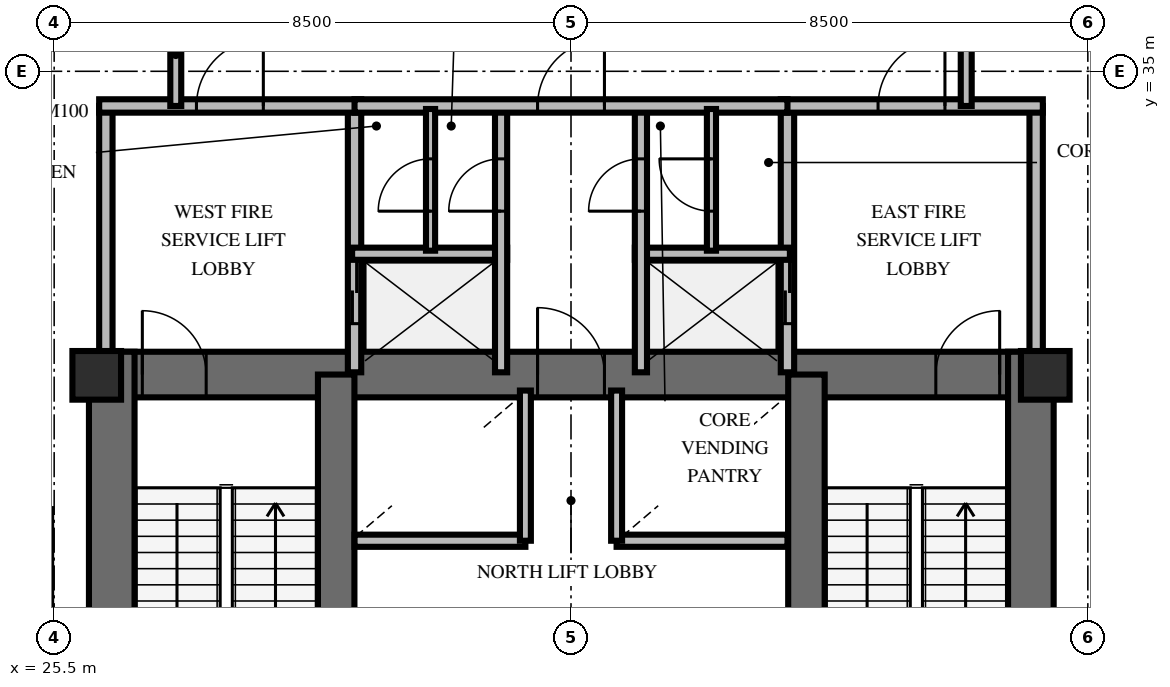
"""IFC4 building model, lengths in metres.
Left out: names, types, materials, properties, quantities, classifications, styles, units other than length and angle.
Written with IfcOpenShell. Run it as: python <this file> out.ifc"""

import sys

from ifc_helpers import new_model, si_unit, direction, frame, frame_2d, origin, origin_2d, place, context, subcontext, project, spatial, rectangle, extrude, element, fill, save


model = new_model("IFC4")
c1 = context("Model", 3, precision=1e-05, world=origin(), true_north=direction((0.0, 1.0)))
c2 = subcontext(c1, "Body", "Model", "MODEL_VIEW")
j1 = project(units=[si_unit("LENGTHUNIT", "METRE"), si_unit("PLANEANGLEUNIT", "RADIAN")], contexts=[c1])
p1 = place(None, origin())
s1 = spatial("IfcSite", under=j1, at=p1, CompositionType="ELEMENT")
p2 = place(p1, origin())
s2 = spatial("IfcBuilding", under=s1, at=p2, CompositionType="ELEMENT")
p3 = place(p2, frame((0.0, 0.0, 109.8)))
s3 = spatial("IfcBuildingStorey", under=s2, at=p3, CompositionType="ELEMENT", Elevation=109.8)
p4 = place(p3, frame((26.072, 30.013, 0.0), z_axis=(0.0, 0.0, 1.0), x_axis=(1.0, 0.0, 0.0)))
e1 = element("IfcWall", 1, at=p4, inside=s3, PredefinedType="SHEAR", context=c2, shape_type="SweptSolid", body=[
    extrude(rectangle(XDim=15.866, YDim=0.75, at=frame_2d((7.933, 0.0))), origin(), (0.0, 0.0, 1.0), 4.0),
])
p5 = place(p4, frame((0.878, 0.0, 0.0)))
e2 = element("IfcOpeningElement", 2, at=p5, cuts=e1, PredefinedType="OPENING", context=c2, shape_type="SweptSolid", body=[
    extrude(rectangle(XDim=1.05, YDim=2.15, at=frame_2d((0.525, 1.075))), frame((0.0, 0.385, 0.0), z_axis=(0.0, -1.0, 0.0), x_axis=(1.0, 0.0, 0.0)), (0.0, 0.0, 1.0), 0.77),
])
p6 = place(p4, frame((13.928, 0.0, 0.0)))
e3 = element("IfcOpeningElement", 3, at=p6, cuts=e1, PredefinedType="OPENING", context=c2, shape_type="SweptSolid", body=[
    extrude(rectangle(XDim=1.05, YDim=2.15, at=frame_2d((0.525, 1.075))), frame((0.0, 0.385, 0.0), z_axis=(0.0, -1.0, 0.0), x_axis=(1.0, 0.0, 0.0)), (0.0, 0.0, 1.0), 0.77),
])
p7 = place(p4, frame((7.378, 0.0, 0.0)))
e4 = element("IfcOpeningElement", 4, at=p7, cuts=e1, PredefinedType="OPENING", context=c2, shape_type="SweptSolid", body=[
    extrude(rectangle(XDim=1.1, YDim=2.15, at=frame_2d((0.55, 1.075))), frame((0.0, 0.385, 0.0), z_axis=(0.0, -1.0, 0.0), x_axis=(1.0, 0.0, 0.0)), (0.0, 0.0, 1.0), 0.77),
])
for number, where, z_axis, x_axis in (
    (5, (26.447, 19.812, 0.0), (0.0, 0.0, 1.0), (0.0, 1.0, 0.0)),
    (6, (41.563, 19.812, 0.0), (0.0, 0.0, 1.0), (0.0, 1.0, 0.0)),
):
    element("IfcWall", number, at=place(p3, frame(where, z_axis=z_axis, x_axis=x_axis)), inside=s3, PredefinedType="SHEAR", context=c2, shape_type="SweptSolid", body=[
        extrude(rectangle(XDim=10.576, YDim=0.75, at=frame_2d((5.288, 0.0))), origin(), (0.0, 0.0, 1.0), 4.0),
    ])
for number, where, z_axis, x_axis in (
    (7, (30.138, 20.187, 0.0), (0.0, 0.0, 1.0), (0.0, 1.0, 0.0)),
    (8, (37.872, 20.187, 0.0), (0.0, 0.0, 1.0), (0.0, 1.0, 0.0)),
):
    element("IfcWall", number, at=place(p3, frame(where, z_axis=z_axis, x_axis=x_axis)), inside=s3, PredefinedType="SHEAR", context=c2, shape_type="SweptSolid", body=[
        extrude(rectangle(XDim=9.826, YDim=0.6, at=frame_2d((4.913, 0.0))), origin(), (0.0, 0.0, 1.0), 4.0),
    ])
for number, where, z_axis, x_axis in (
    (9, (26.2, 30.0, 0.0), (0.0, 0.0, 1.0), (1.0, 0.0, 0.0)),
    (10, (41.8, 30.0, 0.0), (0.0, 0.0, 1.0), (1.0, 0.0, 0.0)),
):
    element("IfcColumn", number, at=place(p3, frame(where, z_axis=z_axis, x_axis=x_axis)), inside=s3, PredefinedType="PILASTER", context=c2, shape_type="SweptSolid", body=[
        extrude(rectangle(XDim=0.8, YDim=0.8, at=origin_2d()), origin(), (0.0, 0.0, 1.0), 4.0),
    ])
p8 = place(p3, frame((26.35, 30.05, 0.0), z_axis=(0.0, 0.0, 1.0), x_axis=(0.0, 1.0, 0.0)))
e11 = element("IfcWall", 11, at=p8, inside=s3, PredefinedType="SOLIDWALL", context=c2, shape_type="SweptSolid", body=[
    extrude(rectangle(XDim=4.38, YDim=0.22, at=frame_2d((2.19, 0.0))), origin(), (0.0, 0.0, 1.0), 2.8),
])
p9 = place(p3, frame((30.44, 30.05, 0.0), z_axis=(0.0, 0.0, 1.0), x_axis=(0.0, 1.0, 0.0)))
e12 = element("IfcWall", 12, at=p9, inside=s3, PredefinedType="SOLIDWALL", context=c2, shape_type="SweptSolid", body=[
    extrude(rectangle(XDim=4.38, YDim=0.22, at=frame_2d((2.19, 0.0))), origin(), (0.0, 0.0, 1.0), 2.8),
])
p10 = place(p9, frame((0.8, 0.0, 0.0)))
e13 = element("IfcOpeningElement", 13, at=p10, cuts=e12, PredefinedType="OPENING", context=c2, shape_type="SweptSolid", body=[
    extrude(rectangle(XDim=1.05, YDim=2.1, at=frame_2d((0.525, 1.05))), frame((0.0, 0.12, 0.0), z_axis=(0.0, -1.0, 0.0), x_axis=(1.0, 0.0, 0.0)), (0.0, 0.0, 1.0), 0.24),
])
p11 = place(p3, frame((26.24, 34.43, 0.0), z_axis=(0.0, 0.0, 1.0), x_axis=(1.0, 0.0, 0.0)))
e14 = element("IfcWall", 14, at=p11, inside=s3, PredefinedType="SOLIDWALL", context=c2, shape_type="SweptSolid", body=[
    extrude(rectangle(XDim=4.31, YDim=0.22, at=frame_2d((2.155, 0.0))), origin(), (0.0, 0.0, 1.0), 2.8),
])
p12 = place(p11, frame((1.6, 0.0, 0.0)))
e15 = element("IfcOpeningElement", 15, at=p12, cuts=e14, PredefinedType="OPENING", context=c2, shape_type="SweptSolid", body=[
    extrude(rectangle(XDim=1.1, YDim=2.15, at=frame_2d((0.55, 1.075))), frame((0.0, 0.12, 0.0), z_axis=(0.0, -1.0, 0.0), x_axis=(1.0, 0.0, 0.0)), (0.0, 0.0, 1.0), 0.24),
])
p13 = place(p3, frame((30.4, 32.0, 0.0), z_axis=(0.0, 0.0, 1.0), x_axis=(1.0, 0.0, 0.0)))
e16 = element("IfcWall", 16, at=p13, inside=s3, PredefinedType="SOLIDWALL", context=c2, shape_type="SweptSolid", body=[
    extrude(rectangle(XDim=2.55, YDim=0.2, at=frame_2d((1.275, 0.0))), origin(), (0.0, 0.0, 1.0), 2.8),
])
p14 = place(p3, frame((32.85, 30.05, 0.0), z_axis=(0.0, 0.0, 1.0), x_axis=(0.0, 1.0, 0.0)))
e17 = element("IfcWall", 17, at=p14, inside=s3, PredefinedType="SOLIDWALL", context=c2, shape_type="SweptSolid", body=[
    extrude(rectangle(XDim=4.38, YDim=0.2, at=frame_2d((2.19, 0.0))), origin(), (0.0, 0.0, 1.0), 2.8),
])
p15 = place(p14, frame((2.65, 0.0, 0.0)))
e18 = element("IfcOpeningElement", 18, at=p15, cuts=e17, PredefinedType="OPENING", context=c2, shape_type="SweptSolid", body=[
    extrude(rectangle(XDim=0.86, YDim=2.05, at=frame_2d((0.43, 1.025))), frame((0.0, 0.11, 0.0), z_axis=(0.0, -1.0, 0.0), x_axis=(1.0, 0.0, 0.0)), (0.0, 0.0, 1.0), 0.22),
])
p16 = place(p3, frame((37.56, 30.05, 0.0), z_axis=(0.0, 0.0, 1.0), x_axis=(0.0, 1.0, 0.0)))
e19 = element("IfcWall", 19, at=p16, inside=s3, PredefinedType="SOLIDWALL", context=c2, shape_type="SweptSolid", body=[
    extrude(rectangle(XDim=4.38, YDim=0.22, at=frame_2d((2.19, 0.0))), origin(), (0.0, 0.0, 1.0), 2.8),
])
p17 = place(p16, frame((0.8, 0.0, 0.0)))
e20 = element("IfcOpeningElement", 20, at=p17, cuts=e19, PredefinedType="OPENING", context=c2, shape_type="SweptSolid", body=[
    extrude(rectangle(XDim=1.05, YDim=2.1, at=frame_2d((0.525, 1.05))), frame((0.0, 0.12, 0.0), z_axis=(0.0, -1.0, 0.0), x_axis=(1.0, 0.0, 0.0)), (0.0, 0.0, 1.0), 0.24),
])
p18 = place(p3, frame((41.65, 30.05, 0.0), z_axis=(0.0, 0.0, 1.0), x_axis=(0.0, 1.0, 0.0)))
e21 = element("IfcWall", 21, at=p18, inside=s3, PredefinedType="SOLIDWALL", context=c2, shape_type="SweptSolid", body=[
    extrude(rectangle(XDim=4.38, YDim=0.22, at=frame_2d((2.19, 0.0))), origin(), (0.0, 0.0, 1.0), 2.8),
])
p19 = place(p3, frame((37.45, 34.43, 0.0), z_axis=(0.0, 0.0, 1.0), x_axis=(1.0, 0.0, 0.0)))
e22 = element("IfcWall", 22, at=p19, inside=s3, PredefinedType="SOLIDWALL", context=c2, shape_type="SweptSolid", body=[
    extrude(rectangle(XDim=4.31, YDim=0.22, at=frame_2d((2.155, 0.0))), origin(), (0.0, 0.0, 1.0), 2.8),
])
p20 = place(p19, frame((1.6, 0.0, 0.0)))
e23 = element("IfcOpeningElement", 23, at=p20, cuts=e22, PredefinedType="OPENING", context=c2, shape_type="SweptSolid", body=[
    extrude(rectangle(XDim=1.1, YDim=2.15, at=frame_2d((0.55, 1.075))), frame((0.0, 0.12, 0.0), z_axis=(0.0, -1.0, 0.0), x_axis=(1.0, 0.0, 0.0)), (0.0, 0.0, 1.0), 0.24),
])
p21 = place(p3, frame((35.05, 32.0, 0.0), z_axis=(0.0, 0.0, 1.0), x_axis=(1.0, 0.0, 0.0)))
e24 = element("IfcWall", 24, at=p21, inside=s3, PredefinedType="SOLIDWALL", context=c2, shape_type="SweptSolid", body=[
    extrude(rectangle(XDim=2.55, YDim=0.2, at=frame_2d((1.275, 0.0))), origin(), (0.0, 0.0, 1.0), 2.8),
])
p22 = place(p3, frame((35.15, 30.05, 0.0), z_axis=(0.0, 0.0, 1.0), x_axis=(0.0, 1.0, 0.0)))
e25 = element("IfcWall", 25, at=p22, inside=s3, PredefinedType="SOLIDWALL", context=c2, shape_type="SweptSolid", body=[
    extrude(rectangle(XDim=4.38, YDim=0.2, at=frame_2d((2.19, 0.0))), origin(), (0.0, 0.0, 1.0), 2.8),
])
p23 = place(p22, frame((2.65, 0.0, 0.0)))
e26 = element("IfcOpeningElement", 26, at=p23, cuts=e25, PredefinedType="OPENING", context=c2, shape_type="SweptSolid", body=[
    extrude(rectangle(XDim=0.86, YDim=2.05, at=frame_2d((0.43, 1.025))), frame((0.0, 0.11, 0.0), z_axis=(0.0, -1.0, 0.0), x_axis=(1.0, 0.0, 0.0)), (0.0, 0.0, 1.0), 0.22),
])
p24 = place(p3, frame((30.44, 34.43, 0.0), z_axis=(0.0, 0.0, 1.0), x_axis=(1.0, 0.0, 0.0)))
e27 = element("IfcWall", 27, at=p24, inside=s3, PredefinedType="SOLIDWALL", context=c2, shape_type="SweptSolid", body=[
    extrude(rectangle(XDim=7.12, YDim=0.22, at=frame_2d((3.56, 0.0))), origin(), (0.0, 0.0, 1.0), 2.8),
])
p25 = place(p24, frame((3.01, 0.0, 0.0)))
e28 = element("IfcOpeningElement", 28, at=p25, cuts=e27, PredefinedType="OPENING", context=c2, shape_type="SweptSolid", body=[
    extrude(rectangle(XDim=1.1, YDim=2.15, at=frame_2d((0.55, 1.075))), frame((0.0, 0.12, 0.0), z_axis=(0.0, -1.0, 0.0), x_axis=(1.0, 0.0, 0.0)), (0.0, 0.0, 1.0), 0.24),
])
p26 = place(p3, frame((31.69, 32.05, 0.0), z_axis=(0.0, 0.0, 1.0), x_axis=(0.0, 1.0, 0.0)))
e29 = element("IfcWall", 29, at=p26, inside=s3, PredefinedType="PARTITIONING", context=c2, shape_type="SweptSolid", body=[
    extrude(rectangle(XDim=2.33, YDim=0.15, at=frame_2d((1.165, 0.0))), origin(), (0.0, 0.0, 1.0), 2.8),
])
p27 = place(p26, frame((0.65, 0.0, 0.0)))
e30 = element("IfcOpeningElement", 30, at=p27, cuts=e29, PredefinedType="OPENING", context=c2, shape_type="SweptSolid", body=[
    extrude(rectangle(XDim=0.86, YDim=2.05, at=frame_2d((0.43, 1.025))), frame((0.0, 0.085, 0.0), z_axis=(0.0, -1.0, 0.0), x_axis=(1.0, 0.0, 0.0)), (0.0, 0.0, 1.0), 0.17),
])
p28 = place(p3, frame((36.31, 32.05, 0.0), z_axis=(0.0, 0.0, 1.0), x_axis=(0.0, 1.0, 0.0)))
e31 = element("IfcWall", 31, at=p28, inside=s3, PredefinedType="PARTITIONING", context=c2, shape_type="SweptSolid", body=[
    extrude(rectangle(XDim=2.33, YDim=0.15, at=frame_2d((1.165, 0.0))), origin(), (0.0, 0.0, 1.0), 2.8),
])
p29 = place(p28, frame((0.65, 0.0, 0.0)))
e32 = element("IfcOpeningElement", 32, at=p29, cuts=e31, PredefinedType="OPENING", context=c2, shape_type="SweptSolid", body=[
    extrude(rectangle(XDim=0.86, YDim=2.05, at=frame_2d((0.43, 1.025))), frame((0.0, 0.085, 0.0), z_axis=(0.0, -1.0, 0.0), x_axis=(1.0, 0.0, 0.0)), (0.0, 0.0, 1.0), 0.17),
])
p30 = place(p3, frame((30.44, 27.28, 0.0), z_axis=(0.0, 0.0, 1.0), x_axis=(1.0, 0.0, 0.0)))
e33 = element("IfcWall", 33, at=p30, inside=s3, PredefinedType="SOLIDWALL", context=c2, shape_type="SweptSolid", body=[
    extrude(rectangle(XDim=2.81, YDim=0.2, at=frame_2d((1.405, 0.0))), origin(), (0.0, 0.0, 1.0), 2.8),
])
p31 = place(p3, frame((33.25, 27.28, 0.0), z_axis=(0.0, 0.0, 1.0), x_axis=(0.0, 1.0, 0.0)))
e34 = element("IfcWall", 34, at=p31, inside=s3, PredefinedType="SOLIDWALL", context=c2, shape_type="SweptSolid", body=[
    extrude(rectangle(XDim=2.47, YDim=0.18, at=frame_2d((1.235, 0.0))), origin(), (0.0, 0.0, 1.0), 2.8),
])
p32 = place(p3, frame((34.75, 27.28, 0.0), z_axis=(0.0, 0.0, 1.0), x_axis=(1.0, 0.0, 0.0)))
e35 = element("IfcWall", 35, at=p32, inside=s3, PredefinedType="SOLIDWALL", context=c2, shape_type="SweptSolid", body=[
    extrude(rectangle(XDim=2.81, YDim=0.2, at=frame_2d((1.405, 0.0))), origin(), (0.0, 0.0, 1.0), 2.8),
])
p33 = place(p3, frame((34.75, 27.28, 0.0), z_axis=(0.0, 0.0, 1.0), x_axis=(0.0, 1.0, 0.0)))
e36 = element("IfcWall", 36, at=p33, inside=s3, PredefinedType="SOLIDWALL", context=c2, shape_type="SweptSolid", body=[
    extrude(rectangle(XDim=2.47, YDim=0.18, at=frame_2d((1.235, 0.0))), origin(), (0.0, 0.0, 1.0), 2.8),
])
for number, where, z_axis, x_axis in (
    (37, (27.5, 34.43, 0.0), (0.0, 0.0, 1.0), (0.0, 1.0, 0.0)),
    (38, (40.5, 36.123, 0.0), (0.0, 0.0, 1.0), (0.0, -1.0, 0.0)),
):
    element("IfcWall", number, at=place(p3, frame(where, z_axis=z_axis, x_axis=x_axis)), inside=s3, PredefinedType="PARTITIONING", context=c2, shape_type="SweptSolid", body=[
        extrude(rectangle(XDim=1.693, YDim=0.18, at=frame_2d((0.846, 0.0))), origin(), (0.0, 0.0, 1.0), 2.8),
    ])
p34 = place(p3, frame((26.613, 37.798, 0.0), z_axis=(0.0, 0.0, 1.0), x_axis=(-0.754140701917, -0.656712876158, 0.0)))
e39 = element("IfcWall", 39, at=p34, inside=s3, PredefinedType="PARTITIONING", context=c2, shape_type="SweptSolid", body=[
    extrude(rectangle(XDim=4.355, YDim=0.18, at=frame_2d((2.178, 0.0))), origin(), (0.0, 0.0, 1.0), 2.8),
])
p35 = place(p34, frame((2.441, 0.0, 0.0)))
e40 = element("IfcOpeningElement", 40, at=p35, cuts=e39, PredefinedType="OPENING", context=c2, shape_type="SweptSolid", body=[
    extrude(rectangle(XDim=1.0, YDim=2.15, at=frame_2d((0.5, 1.075))), frame((0.0, 0.1, 0.0), z_axis=(0.0, -1.0, 0.0), x_axis=(1.0, 0.0, 0.0)), (0.0, 0.0, 1.0), 0.2),
])
p36 = place(p3, frame((44.962, 34.58, 0.0), z_axis=(0.0, 0.0, 1.0), x_axis=(-0.743728409831, 0.668481901333, 0.0)))
e41 = element("IfcWall", 41, at=p36, inside=s3, PredefinedType="PARTITIONING", context=c2, shape_type="SweptSolid", body=[
    extrude(rectangle(XDim=4.834, YDim=0.18, at=frame_2d((2.417, 0.0))), origin(), (0.0, 0.0, 1.0), 2.8),
])
p37 = place(p5, origin())
e42 = element("IfcDoor", 42, at=p37, inside=s3, OperationType="SINGLE_SWING_LEFT", PredefinedType="DOOR", context=c2, shape_type="SweptSolid", body=[
    extrude(rectangle(XDim=1.05, YDim=2.15, at=frame_2d((0.525, 1.075))), frame((0.0, 0.025, 0.0), z_axis=(0.0, -1.0, 0.0), x_axis=(1.0, 0.0, 0.0)), (0.0, 0.0, 1.0), 0.05),
])
fill(e2, e42)
p38 = place(p6, origin())
e43 = element("IfcDoor", 43, at=p38, inside=s3, OperationType="SINGLE_SWING_RIGHT", PredefinedType="DOOR", context=c2, shape_type="SweptSolid", body=[
    extrude(rectangle(XDim=1.05, YDim=2.15, at=frame_2d((0.525, 1.075))), frame((0.0, 0.025, 0.0), z_axis=(0.0, -1.0, 0.0), x_axis=(1.0, 0.0, 0.0)), (0.0, 0.0, 1.0), 0.05),
])
fill(e3, e43)
p39 = place(p7, origin())
e44 = element("IfcDoor", 44, at=p39, inside=s3, OperationType="SINGLE_SWING_LEFT", PredefinedType="DOOR", context=c2, shape_type="SweptSolid", body=[
    extrude(rectangle(XDim=1.1, YDim=2.15, at=frame_2d((0.55, 1.075))), frame((0.0, 0.025, 0.0), z_axis=(0.0, -1.0, 0.0), x_axis=(1.0, 0.0, 0.0)), (0.0, 0.0, 1.0), 0.05),
])
fill(e4, e44)
p40 = place(p12, origin())
e45 = element("IfcDoor", 45, at=p40, inside=s3, OperationType="SINGLE_SWING_RIGHT", PredefinedType="DOOR", context=c2, shape_type="SweptSolid", body=[
    extrude(rectangle(XDim=1.1, YDim=2.15, at=frame_2d((0.55, 1.075))), frame((0.0, 0.025, 0.0), z_axis=(0.0, -1.0, 0.0), x_axis=(1.0, 0.0, 0.0)), (0.0, 0.0, 1.0), 0.05),
])
fill(e15, e45)
p41 = place(p10, origin())
e46 = element("IfcDoor", 46, at=p41, inside=s3, OperationType="DOUBLE_DOOR_SLIDING", PredefinedType="USERDEFINED", context=c2, shape_type="SweptSolid", body=[
    extrude(rectangle(XDim=1.05, YDim=2.1, at=frame_2d((0.525, 1.05))), frame((0.0, 0.025, 0.0), z_axis=(0.0, -1.0, 0.0), x_axis=(1.0, 0.0, 0.0)), (0.0, 0.0, 1.0), 0.05),
])
fill(e13, e46)
p42 = place(p15, origin())
e47 = element("IfcDoor", 47, at=p42, inside=s3, OperationType="SINGLE_SWING_LEFT", PredefinedType="TRAPDOOR", context=c2, shape_type="SweptSolid", body=[
    extrude(rectangle(XDim=0.86, YDim=2.05, at=frame_2d((0.43, 1.025))), frame((0.0, 0.025, 0.0), z_axis=(0.0, -1.0, 0.0), x_axis=(1.0, 0.0, 0.0)), (0.0, 0.0, 1.0), 0.05),
])
fill(e18, e47)
p43 = place(p20, origin())
e48 = element("IfcDoor", 48, at=p43, inside=s3, OperationType="SINGLE_SWING_RIGHT", PredefinedType="DOOR", context=c2, shape_type="SweptSolid", body=[
    extrude(rectangle(XDim=1.1, YDim=2.15, at=frame_2d((0.55, 1.075))), frame((0.0, 0.025, 0.0), z_axis=(0.0, -1.0, 0.0), x_axis=(1.0, 0.0, 0.0)), (0.0, 0.0, 1.0), 0.05),
])
fill(e23, e48)
p44 = place(p17, origin())
e49 = element("IfcDoor", 49, at=p44, inside=s3, OperationType="DOUBLE_DOOR_SLIDING", PredefinedType="USERDEFINED", context=c2, shape_type="SweptSolid", body=[
    extrude(rectangle(XDim=1.05, YDim=2.1, at=frame_2d((0.525, 1.05))), frame((0.0, 0.025, 0.0), z_axis=(0.0, -1.0, 0.0), x_axis=(1.0, 0.0, 0.0)), (0.0, 0.0, 1.0), 0.05),
])
fill(e20, e49)
p45 = place(p23, origin())
e50 = element("IfcDoor", 50, at=p45, inside=s3, OperationType="SINGLE_SWING_LEFT", PredefinedType="TRAPDOOR", context=c2, shape_type="SweptSolid", body=[
    extrude(rectangle(XDim=0.86, YDim=2.05, at=frame_2d((0.43, 1.025))), frame((0.0, 0.025, 0.0), z_axis=(0.0, -1.0, 0.0), x_axis=(1.0, 0.0, 0.0)), (0.0, 0.0, 1.0), 0.05),
])
fill(e26, e50)
p46 = place(p25, origin())
e51 = element("IfcDoor", 51, at=p46, inside=s3, OperationType="SINGLE_SWING_RIGHT", PredefinedType="DOOR", context=c2, shape_type="SweptSolid", body=[
    extrude(rectangle(XDim=1.1, YDim=2.15, at=frame_2d((0.55, 1.075))), frame((0.0, 0.025, 0.0), z_axis=(0.0, -1.0, 0.0), x_axis=(1.0, 0.0, 0.0)), (0.0, 0.0, 1.0), 0.05),
])
fill(e28, e51)
p47 = place(p27, origin())
e52 = element("IfcDoor", 52, at=p47, inside=s3, OperationType="SINGLE_SWING_LEFT", PredefinedType="TRAPDOOR", context=c2, shape_type="SweptSolid", body=[
    extrude(rectangle(XDim=0.86, YDim=2.05, at=frame_2d((0.43, 1.025))), frame((0.0, 0.025, 0.0), z_axis=(0.0, -1.0, 0.0), x_axis=(1.0, 0.0, 0.0)), (0.0, 0.0, 1.0), 0.05),
])
fill(e30, e52)
p48 = place(p29, origin())
e53 = element("IfcDoor", 53, at=p48, inside=s3, OperationType="SINGLE_SWING_RIGHT", PredefinedType="TRAPDOOR", context=c2, shape_type="SweptSolid", body=[
    extrude(rectangle(XDim=0.86, YDim=2.05, at=frame_2d((0.43, 1.025))), frame((0.0, 0.025, 0.0), z_axis=(0.0, -1.0, 0.0), x_axis=(1.0, 0.0, 0.0)), (0.0, 0.0, 1.0), 0.05),
])
fill(e32, e53)
save(model, sys.argv[1])
